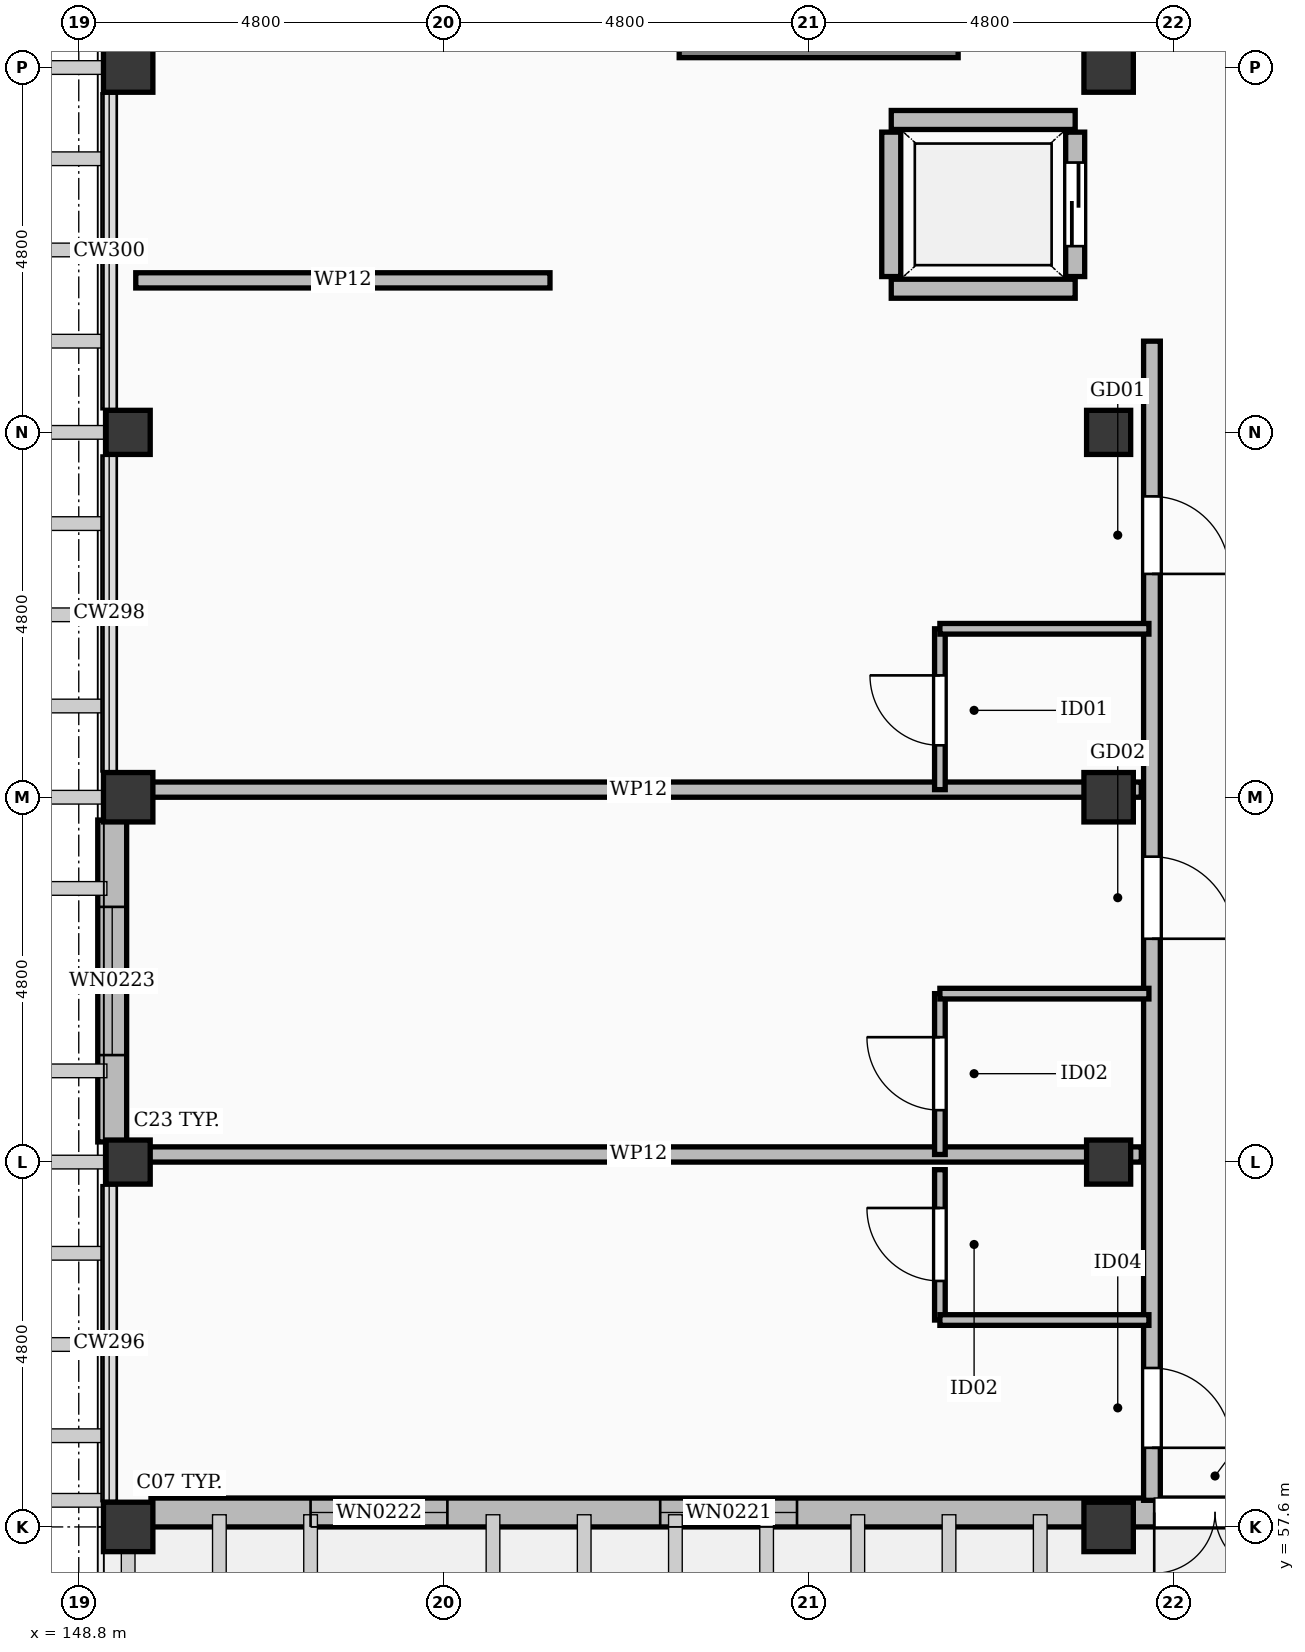
"""IFC4 building model, lengths in metres.
Left out: names, types, materials, properties, quantities, classifications, styles, units other than length and angle.
Written with IfcOpenShell. Run it as: python <this file> out.ifc"""

import sys

from ifc_helpers import new_model, si_unit, direction, frame, frame_2d, origin, origin_2d, place, context, subcontext, project, spatial, rectangle, extrude, element, fill, save


model = new_model("IFC4")
c1 = context("Model", 3, precision=1e-05, world=origin(), true_north=direction((0.0, 1.0)))
c2 = subcontext(c1, "Body", "Model", "MODEL_VIEW")
j1 = project(units=[si_unit("LENGTHUNIT", "METRE"), si_unit("PLANEANGLEUNIT", "RADIAN")], contexts=[c1])
p1 = place(None, origin())
s1 = spatial("IfcSite", under=j1, at=p1, CompositionType="ELEMENT")
p2 = place(p1, origin())
s2 = spatial("IfcBuilding", under=s1, at=p2, CompositionType="ELEMENT")
p3 = place(p2, frame((0.0, 0.0, 39.0)))
s3 = spatial("IfcBuildingStorey", under=s2, at=p3, CompositionType="ELEMENT", Elevation=39.0)
for number, where, z_axis, x_axis in (
    (1, (149.45, 57.6, 0.0), (0.0, 0.0, 1.0), (1.0, 0.0, 0.0)),
    (2, (149.45, 67.2, 0.0), (0.0, 0.0, 1.0), (1.0, 0.0, 0.0)),
    (3, (149.45, 76.8, 0.0), (0.0, 0.0, 1.0), (1.0, 0.0, 0.0)),
    (4, (162.35, 57.6, 0.0), (0.0, 0.0, 1.0), (1.0, 0.0, 0.0)),
    (5, (162.35, 67.2, 0.0), (0.0, 0.0, 1.0), (1.0, 0.0, 0.0)),
    (6, (162.35, 76.8, 0.0), (0.0, 0.0, 1.0), (1.0, 0.0, 0.0)),
):
    element("IfcColumn", number, at=place(p3, frame(where, z_axis=z_axis, x_axis=x_axis)), inside=s3, PredefinedType="COLUMN", context=c2, shape_type="SweptSolid", body=[
        extrude(rectangle(XDim=0.65, YDim=0.65, at=origin_2d()), origin(), (0.0, 0.0, 1.0), 3.6),
    ])
for number, where, z_axis, x_axis in (
    (7, (149.45, 62.4, 0.0), (0.0, 0.0, 1.0), (1.0, 0.0, 0.0)),
    (8, (149.45, 72.0, 0.0), (0.0, 0.0, 1.0), (1.0, 0.0, 0.0)),
    (9, (162.35, 62.4, 0.0), (0.0, 0.0, 1.0), (1.0, 0.0, 0.0)),
    (10, (162.35, 72.0, 0.0), (0.0, 0.0, 1.0), (1.0, 0.0, 0.0)),
):
    element("IfcColumn", number, at=place(p3, frame(where, z_axis=z_axis, x_axis=x_axis)), inside=s3, PredefinedType="COLUMN", context=c2, shape_type="SweptSolid", body=[
        extrude(rectangle(XDim=0.58, YDim=0.58, at=origin_2d()), origin(), (0.0, 0.0, 1.0), 3.6),
    ])
p4 = place(p3, frame((179.05, 57.79, 0.0), z_axis=(0.0, 0.0, 1.0), x_axis=(-1.0, 0.0, 0.0)))
e11 = element("IfcWall", 11, at=p4, inside=s3, PredefinedType="SOLIDWALL", context=c2, shape_type="SweptSolid", body=[
    extrude(rectangle(XDim=29.3, YDim=0.38, at=frame_2d((14.65, 0.0))), origin(), (0.0, 0.0, 1.0), 2.602),
])
p5 = place(p4, frame((14.5, 0.0, 0.0)))
e12 = element("IfcOpeningElement", 12, at=p5, cuts=e11, PredefinedType="OPENING", context=c2, shape_type="SweptSolid", body=[
    extrude(rectangle(XDim=1.6, YDim=2.25, at=frame_2d((0.8, 1.125))), frame((0.0, 0.202, 0.0), z_axis=(0.0, -1.0, 0.0), x_axis=(1.0, 0.0, 0.0)), (0.0, 0.0, 1.0), 0.404),
])
p6 = place(p4, frame((4.0, 0.0, 0.55)))
e13 = element("IfcOpeningElement", 13, at=p6, cuts=e11, PredefinedType="OPENING", context=c2, shape_type="SweptSolid", body=[
    extrude(rectangle(XDim=1.8, YDim=1.76, at=frame_2d((0.9, 0.88))), frame((0.0, 0.202, 0.0), z_axis=(0.0, -1.0, 0.0), x_axis=(1.0, 0.0, 0.0)), (0.0, 0.0, 1.0), 0.404),
])
p7 = place(p4, frame((9.6, 0.0, 0.55)))
e14 = element("IfcOpeningElement", 14, at=p7, cuts=e11, PredefinedType="OPENING", context=c2, shape_type="SweptSolid", body=[
    extrude(rectangle(XDim=1.8, YDim=1.76, at=frame_2d((0.9, 0.88))), frame((0.0, 0.202, 0.0), z_axis=(0.0, -1.0, 0.0), x_axis=(1.0, 0.0, 0.0)), (0.0, 0.0, 1.0), 0.404),
])
p8 = place(p4, frame((20.8, 0.0, 0.55)))
e15 = element("IfcOpeningElement", 15, at=p8, cuts=e11, PredefinedType="OPENING", context=c2, shape_type="SweptSolid", body=[
    extrude(rectangle(XDim=1.8, YDim=1.76, at=frame_2d((0.9, 0.88))), frame((0.0, 0.202, 0.0), z_axis=(0.0, -1.0, 0.0), x_axis=(1.0, 0.0, 0.0)), (0.0, 0.0, 1.0), 0.404),
])
p9 = place(p4, frame((25.4, 0.0, 0.55)))
e16 = element("IfcOpeningElement", 16, at=p9, cuts=e11, PredefinedType="OPENING", context=c2, shape_type="SweptSolid", body=[
    extrude(rectangle(XDim=1.8, YDim=1.76, at=frame_2d((0.9, 0.88))), frame((0.0, 0.202, 0.0), z_axis=(0.0, -1.0, 0.0), x_axis=(1.0, 0.0, 0.0)), (0.0, 0.0, 1.0), 0.404),
])
p10 = place(p3, frame((149.24, 62.665, 0.0), z_axis=(0.0, 0.0, 1.0), x_axis=(0.0, 1.0, 0.0)))
e17 = element("IfcWall", 17, at=p10, inside=s3, PredefinedType="SOLIDWALL", context=c2, shape_type="SweptSolid", body=[
    extrude(rectangle(XDim=4.235, YDim=0.38, at=frame_2d((2.117, 0.0))), origin(), (0.0, 0.0, 1.0), 2.772),
])
p11 = place(p10, frame((1.143, 0.0, 0.55)))
e18 = element("IfcOpeningElement", 18, at=p11, cuts=e17, PredefinedType="OPENING", context=c2, shape_type="SweptSolid", body=[
    extrude(rectangle(XDim=1.95, YDim=1.77, at=frame_2d((0.975, 0.885))), frame((0.0, 0.202, 0.0), z_axis=(0.0, -1.0, 0.0), x_axis=(1.0, 0.0, 0.0)), (0.0, 0.0, 1.0), 0.404),
])
p12 = place(p3, frame((156.7, 77.18, 0.0), z_axis=(0.0, 0.0, 1.0), x_axis=(1.0, 0.0, 0.0)))
e19 = element("IfcWall", 19, at=p12, inside=s3, PredefinedType="SHEAR", context=c2, shape_type="SweptSolid", body=[
    extrude(rectangle(XDim=3.67, YDim=0.5, at=frame_2d((1.835, 0.0))), origin(), (0.0, 0.0, 1.0), 3.36),
])
for number, where, z_axis, x_axis in (
    (20, (159.49, 73.89, 0.0), (0.0, 0.0, 1.0), (1.0, 0.0, 0.0)),
    (21, (159.49, 76.11, 0.0), (0.0, 0.0, 1.0), (1.0, 0.0, 0.0)),
):
    element("IfcWall", number, at=place(p3, frame(where, z_axis=z_axis, x_axis=x_axis)), inside=s3, PredefinedType="SOLIDWALL", context=c2, shape_type="SweptSolid", body=[
        extrude(rectangle(XDim=2.42, YDim=0.25, at=frame_2d((1.21, 0.0))), origin(), (0.0, 0.0, 1.0), 3.36),
    ])
p13 = place(p3, frame((159.49, 74.05, 0.0), z_axis=(0.0, 0.0, 1.0), x_axis=(0.0, 1.0, 0.0)))
e22 = element("IfcWall", 22, at=p13, inside=s3, PredefinedType="SOLIDWALL", context=c2, shape_type="SweptSolid", body=[
    extrude(rectangle(XDim=1.9, YDim=0.25, at=frame_2d((0.95, 0.0))), origin(), (0.0, 0.0, 1.0), 3.36),
])
p14 = place(p3, frame((161.91, 74.05, 0.0), z_axis=(0.0, 0.0, 1.0), x_axis=(0.0, 1.0, 0.0)))
e23 = element("IfcWall", 23, at=p14, inside=s3, PredefinedType="SOLIDWALL", context=c2, shape_type="SweptSolid", body=[
    extrude(rectangle(XDim=1.9, YDim=0.25, at=frame_2d((0.95, 0.0))), origin(), (0.0, 0.0, 1.0), 3.36),
])
p15 = place(p14, frame((0.4, 0.0, 0.0)))
e24 = element("IfcOpeningElement", 24, at=p15, cuts=e23, PredefinedType="OPENING", context=c2, shape_type="SweptSolid", body=[
    extrude(rectangle(XDim=1.1, YDim=2.2, at=frame_2d((0.55, 1.1))), frame((0.0, 0.137, 0.0), z_axis=(0.0, -1.0, 0.0), x_axis=(1.0, 0.0, 0.0)), (0.0, 0.0, 1.0), 0.274),
])
p16 = place(p3, frame((162.92, 57.95, 0.0), z_axis=(0.0, 0.0, 1.0), x_axis=(0.0, 1.0, 0.0)))
e25 = element("IfcWall", 25, at=p16, inside=s3, PredefinedType="PARTITIONING", context=c2, shape_type="SweptSolid", body=[
    extrude(rectangle(XDim=15.25, YDim=0.22, at=frame_2d((7.625, 0.0))), origin(), (0.0, 0.0, 1.0), 2.772),
])
p17 = place(p16, frame((0.691, 0.0, 0.0)))
e26 = element("IfcOpeningElement", 26, at=p17, cuts=e25, PredefinedType="OPENING", context=c2, shape_type="SweptSolid", body=[
    extrude(rectangle(XDim=1.05, YDim=2.18, at=frame_2d((0.525, 1.09))), frame((0.0, 0.122, 0.0), z_axis=(0.0, -1.0, 0.0), x_axis=(1.0, 0.0, 0.0)), (0.0, 0.0, 1.0), 0.244),
])
p18 = place(p16, frame((7.388, 0.0, 0.0)))
e27 = element("IfcOpeningElement", 27, at=p18, cuts=e25, PredefinedType="OPENING", context=c2, shape_type="SweptSolid", body=[
    extrude(rectangle(XDim=1.08, YDim=2.25, at=frame_2d((0.54, 1.125))), frame((0.0, 0.122, 0.0), z_axis=(0.0, -1.0, 0.0), x_axis=(1.0, 0.0, 0.0)), (0.0, 0.0, 1.0), 0.244),
])
p19 = place(p16, frame((12.188, 0.0, 0.0)))
e28 = element("IfcOpeningElement", 28, at=p19, cuts=e25, PredefinedType="OPENING", context=c2, shape_type="SweptSolid", body=[
    extrude(rectangle(XDim=1.02, YDim=2.2, at=frame_2d((0.51, 1.1))), frame((0.0, 0.122, 0.0), z_axis=(0.0, -1.0, 0.0), x_axis=(1.0, 0.0, 0.0)), (0.0, 0.0, 1.0), 0.244),
])
p20 = place(p3, frame((149.55, 74.0, 0.0), z_axis=(0.0, 0.0, 1.0), x_axis=(1.0, 0.0, 0.0)))
e29 = element("IfcWall", 29, at=p20, inside=s3, PredefinedType="PARTITIONING", context=c2, shape_type="SweptSolid", body=[
    extrude(rectangle(XDim=5.45, YDim=0.2, at=frame_2d((2.725, 0.0))), origin(), (0.0, 0.0, 1.0), 2.772),
])
p21 = place(p3, frame((160.13, 60.322, 0.0), z_axis=(0.0, 0.0, 1.0), x_axis=(0.0, 1.0, 0.0)))
e30 = element("IfcWall", 30, at=p21, inside=s3, PredefinedType="PARTITIONING", context=c2, shape_type="SweptSolid", body=[
    extrude(rectangle(XDim=1.978, YDim=0.14, at=frame_2d((0.989, 0.0))), origin(), (0.0, 0.0, 1.0), 2.772),
])
p22 = place(p21, frame((0.514, 0.0, 0.0)))
e31 = element("IfcOpeningElement", 31, at=p22, cuts=e30, PredefinedType="OPENING", context=c2, shape_type="SweptSolid", body=[
    extrude(rectangle(XDim=0.96, YDim=2.12, at=frame_2d((0.48, 1.06))), frame((0.0, 0.082, 0.0), z_axis=(0.0, -1.0, 0.0), x_axis=(1.0, 0.0, 0.0)), (0.0, 0.0, 1.0), 0.164),
])
p23 = place(p3, frame((160.13, 60.322, 0.0), z_axis=(0.0, 0.0, 1.0), x_axis=(1.0, 0.0, 0.0)))
e32 = element("IfcWall", 32, at=p23, inside=s3, PredefinedType="PARTITIONING", context=c2, shape_type="SweptSolid", body=[
    extrude(rectangle(XDim=2.75, YDim=0.14, at=frame_2d((1.375, 0.0))), origin(), (0.0, 0.0, 1.0), 2.772),
])
p24 = place(p3, frame((149.55, 62.5, 0.0), z_axis=(0.0, 0.0, 1.0), x_axis=(1.0, 0.0, 0.0)))
e33 = element("IfcWall", 33, at=p24, inside=s3, PredefinedType="PARTITIONING", context=c2, shape_type="SweptSolid", body=[
    extrude(rectangle(XDim=13.23, YDim=0.2, at=frame_2d((6.615, 0.0))), origin(), (0.0, 0.0, 1.0), 2.772),
])
p25 = place(p3, frame((160.13, 62.5, 0.0), z_axis=(0.0, 0.0, 1.0), x_axis=(0.0, 1.0, 0.0)))
e34 = element("IfcWall", 34, at=p25, inside=s3, PredefinedType="PARTITIONING", context=c2, shape_type="SweptSolid", body=[
    extrude(rectangle(XDim=2.116, YDim=0.14, at=frame_2d((1.058, 0.0))), origin(), (0.0, 0.0, 1.0), 2.772),
])
p26 = place(p25, frame((0.583, 0.0, 0.0)))
e35 = element("IfcOpeningElement", 35, at=p26, cuts=e34, PredefinedType="OPENING", context=c2, shape_type="SweptSolid", body=[
    extrude(rectangle(XDim=0.96, YDim=2.12, at=frame_2d((0.48, 1.06))), frame((0.0, 0.082, 0.0), z_axis=(0.0, -1.0, 0.0), x_axis=(1.0, 0.0, 0.0)), (0.0, 0.0, 1.0), 0.164),
])
p27 = place(p3, frame((160.13, 64.616, 0.0), z_axis=(0.0, 0.0, 1.0), x_axis=(1.0, 0.0, 0.0)))
e36 = element("IfcWall", 36, at=p27, inside=s3, PredefinedType="PARTITIONING", context=c2, shape_type="SweptSolid", body=[
    extrude(rectangle(XDim=2.75, YDim=0.14, at=frame_2d((1.375, 0.0))), origin(), (0.0, 0.0, 1.0), 2.772),
])
p28 = place(p3, frame((149.55, 67.3, 0.0), z_axis=(0.0, 0.0, 1.0), x_axis=(1.0, 0.0, 0.0)))
e37 = element("IfcWall", 37, at=p28, inside=s3, PredefinedType="PARTITIONING", context=c2, shape_type="SweptSolid", body=[
    extrude(rectangle(XDim=13.23, YDim=0.2, at=frame_2d((6.615, 0.0))), origin(), (0.0, 0.0, 1.0), 2.772),
])
p29 = place(p3, frame((160.13, 67.3, 0.0), z_axis=(0.0, 0.0, 1.0), x_axis=(0.0, 1.0, 0.0)))
e38 = element("IfcWall", 38, at=p29, inside=s3, PredefinedType="PARTITIONING", context=c2, shape_type="SweptSolid", body=[
    extrude(rectangle(XDim=2.116, YDim=0.14, at=frame_2d((1.058, 0.0))), origin(), (0.0, 0.0, 1.0), 2.772),
])
p30 = place(p29, frame((0.583, 0.0, 0.0)))
e39 = element("IfcOpeningElement", 39, at=p30, cuts=e38, PredefinedType="OPENING", context=c2, shape_type="SweptSolid", body=[
    extrude(rectangle(XDim=0.92, YDim=2.1, at=frame_2d((0.46, 1.05))), frame((0.0, 0.082, 0.0), z_axis=(0.0, -1.0, 0.0), x_axis=(1.0, 0.0, 0.0)), (0.0, 0.0, 1.0), 0.164),
])
p31 = place(p3, frame((160.13, 69.416, 0.0), z_axis=(0.0, 0.0, 1.0), x_axis=(1.0, 0.0, 0.0)))
e40 = element("IfcWall", 40, at=p31, inside=s3, PredefinedType="PARTITIONING", context=c2, shape_type="SweptSolid", body=[
    extrude(rectangle(XDim=2.75, YDim=0.14, at=frame_2d((1.375, 0.0))), origin(), (0.0, 0.0, 1.0), 2.772),
])
p32 = place(p5, origin())
e41 = element("IfcDoor", 41, at=p32, inside=s3, OperationType="DOUBLE_DOOR_SINGLE_SWING", PredefinedType="DOOR", context=c2, shape_type="SweptSolid", body=[
    extrude(rectangle(XDim=1.6, YDim=2.25, at=frame_2d((0.8, 1.125))), frame((0.0, 0.025, 0.0), z_axis=(0.0, -1.0, 0.0), x_axis=(1.0, 0.0, 0.0)), (0.0, 0.0, 1.0), 0.05),
])
fill(e12, e41)
p33 = place(p8, origin())
e42 = element("IfcWindow", 42, at=p33, inside=s3, PartitioningType="SINGLE_PANEL", PredefinedType="WINDOW", context=c2, shape_type="SweptSolid", body=[
    extrude(rectangle(XDim=1.8, YDim=1.76, at=frame_2d((0.9, 0.88))), frame((0.0, 0.03, 0.0), z_axis=(0.0, -1.0, 0.0), x_axis=(1.0, 0.0, 0.0)), (0.0, 0.0, 1.0), 0.06),
])
fill(e15, e42)
p34 = place(p9, origin())
e43 = element("IfcWindow", 43, at=p34, inside=s3, PartitioningType="SINGLE_PANEL", PredefinedType="WINDOW", context=c2, shape_type="SweptSolid", body=[
    extrude(rectangle(XDim=1.8, YDim=1.76, at=frame_2d((0.9, 0.88))), frame((0.0, 0.03, 0.0), z_axis=(0.0, -1.0, 0.0), x_axis=(1.0, 0.0, 0.0)), (0.0, 0.0, 1.0), 0.06),
])
fill(e16, e43)
p35 = place(p11, origin())
e44 = element("IfcWindow", 44, at=p35, inside=s3, PartitioningType="SINGLE_PANEL", PredefinedType="WINDOW", context=c2, shape_type="SweptSolid", body=[
    extrude(rectangle(XDim=1.95, YDim=1.77, at=frame_2d((0.975, 0.885))), frame((0.0, 0.03, 0.0), z_axis=(0.0, -1.0, 0.0), x_axis=(1.0, 0.0, 0.0)), (0.0, 0.0, 1.0), 0.06),
])
fill(e18, e44)
p36 = place(p15, origin())
e45 = element("IfcDoor", 45, at=p36, inside=s3, OperationType="SLIDING_TO_LEFT", PredefinedType="DOOR", context=c2, shape_type="SweptSolid", body=[
    extrude(rectangle(XDim=1.1, YDim=2.2, at=frame_2d((0.55, 1.1))), frame((0.0, 0.025, 0.0), z_axis=(0.0, -1.0, 0.0), x_axis=(1.0, 0.0, 0.0)), (0.0, 0.0, 1.0), 0.05),
])
fill(e24, e45)
p37 = place(p17, frame((1.05, 0.0, 0.0), z_axis=(0.0, 0.0, 1.0), x_axis=(-1.0, 0.0, 0.0)))
e46 = element("IfcDoor", 46, at=p37, inside=s3, OperationType="SINGLE_SWING_LEFT", PredefinedType="DOOR", context=c2, shape_type="SweptSolid", body=[
    extrude(rectangle(XDim=1.05, YDim=2.18, at=frame_2d((0.525, 1.09))), frame((0.0, 0.025, 0.0), z_axis=(0.0, -1.0, 0.0), x_axis=(1.0, 0.0, 0.0)), (0.0, 0.0, 1.0), 0.05),
])
fill(e26, e46)
p38 = place(p22, origin())
e47 = element("IfcDoor", 47, at=p38, inside=s3, OperationType="SINGLE_SWING_RIGHT", PredefinedType="DOOR", context=c2, shape_type="SweptSolid", body=[
    extrude(rectangle(XDim=0.96, YDim=2.12, at=frame_2d((0.48, 1.06))), frame((0.0, 0.025, 0.0), z_axis=(0.0, -1.0, 0.0), x_axis=(1.0, 0.0, 0.0)), (0.0, 0.0, 1.0), 0.05),
])
fill(e31, e47)
p39 = place(p18, frame((1.08, 0.0, 0.0), z_axis=(0.0, 0.0, 1.0), x_axis=(-1.0, 0.0, 0.0)))
e48 = element("IfcDoor", 48, at=p39, inside=s3, OperationType="SINGLE_SWING_LEFT", PredefinedType="DOOR", context=c2, shape_type="SweptSolid", body=[
    extrude(rectangle(XDim=1.08, YDim=2.25, at=frame_2d((0.54, 1.125))), frame((0.0, 0.025, 0.0), z_axis=(0.0, -1.0, 0.0), x_axis=(1.0, 0.0, 0.0)), (0.0, 0.0, 1.0), 0.05),
])
fill(e27, e48)
p40 = place(p26, origin())
e49 = element("IfcDoor", 49, at=p40, inside=s3, OperationType="SINGLE_SWING_RIGHT", PredefinedType="DOOR", context=c2, shape_type="SweptSolid", body=[
    extrude(rectangle(XDim=0.96, YDim=2.12, at=frame_2d((0.48, 1.06))), frame((0.0, 0.025, 0.0), z_axis=(0.0, -1.0, 0.0), x_axis=(1.0, 0.0, 0.0)), (0.0, 0.0, 1.0), 0.05),
])
fill(e35, e49)
p41 = place(p19, frame((1.02, 0.0, 0.0), z_axis=(0.0, 0.0, 1.0), x_axis=(-1.0, 0.0, 0.0)))
e50 = element("IfcDoor", 50, at=p41, inside=s3, OperationType="SINGLE_SWING_LEFT", PredefinedType="DOOR", context=c2, shape_type="SweptSolid", body=[
    extrude(rectangle(XDim=1.02, YDim=2.2, at=frame_2d((0.51, 1.1))), frame((0.0, 0.025, 0.0), z_axis=(0.0, -1.0, 0.0), x_axis=(1.0, 0.0, 0.0)), (0.0, 0.0, 1.0), 0.05),
])
fill(e28, e50)
p42 = place(p30, origin())
e51 = element("IfcDoor", 51, at=p42, inside=s3, OperationType="SINGLE_SWING_RIGHT", PredefinedType="DOOR", context=c2, shape_type="SweptSolid", body=[
    extrude(rectangle(XDim=0.92, YDim=2.1, at=frame_2d((0.46, 1.05))), frame((0.0, 0.025, 0.0), z_axis=(0.0, -1.0, 0.0), x_axis=(1.0, 0.0, 0.0)), (0.0, 0.0, 1.0), 0.05),
])
fill(e39, e51)
save(model, sys.argv[1])
